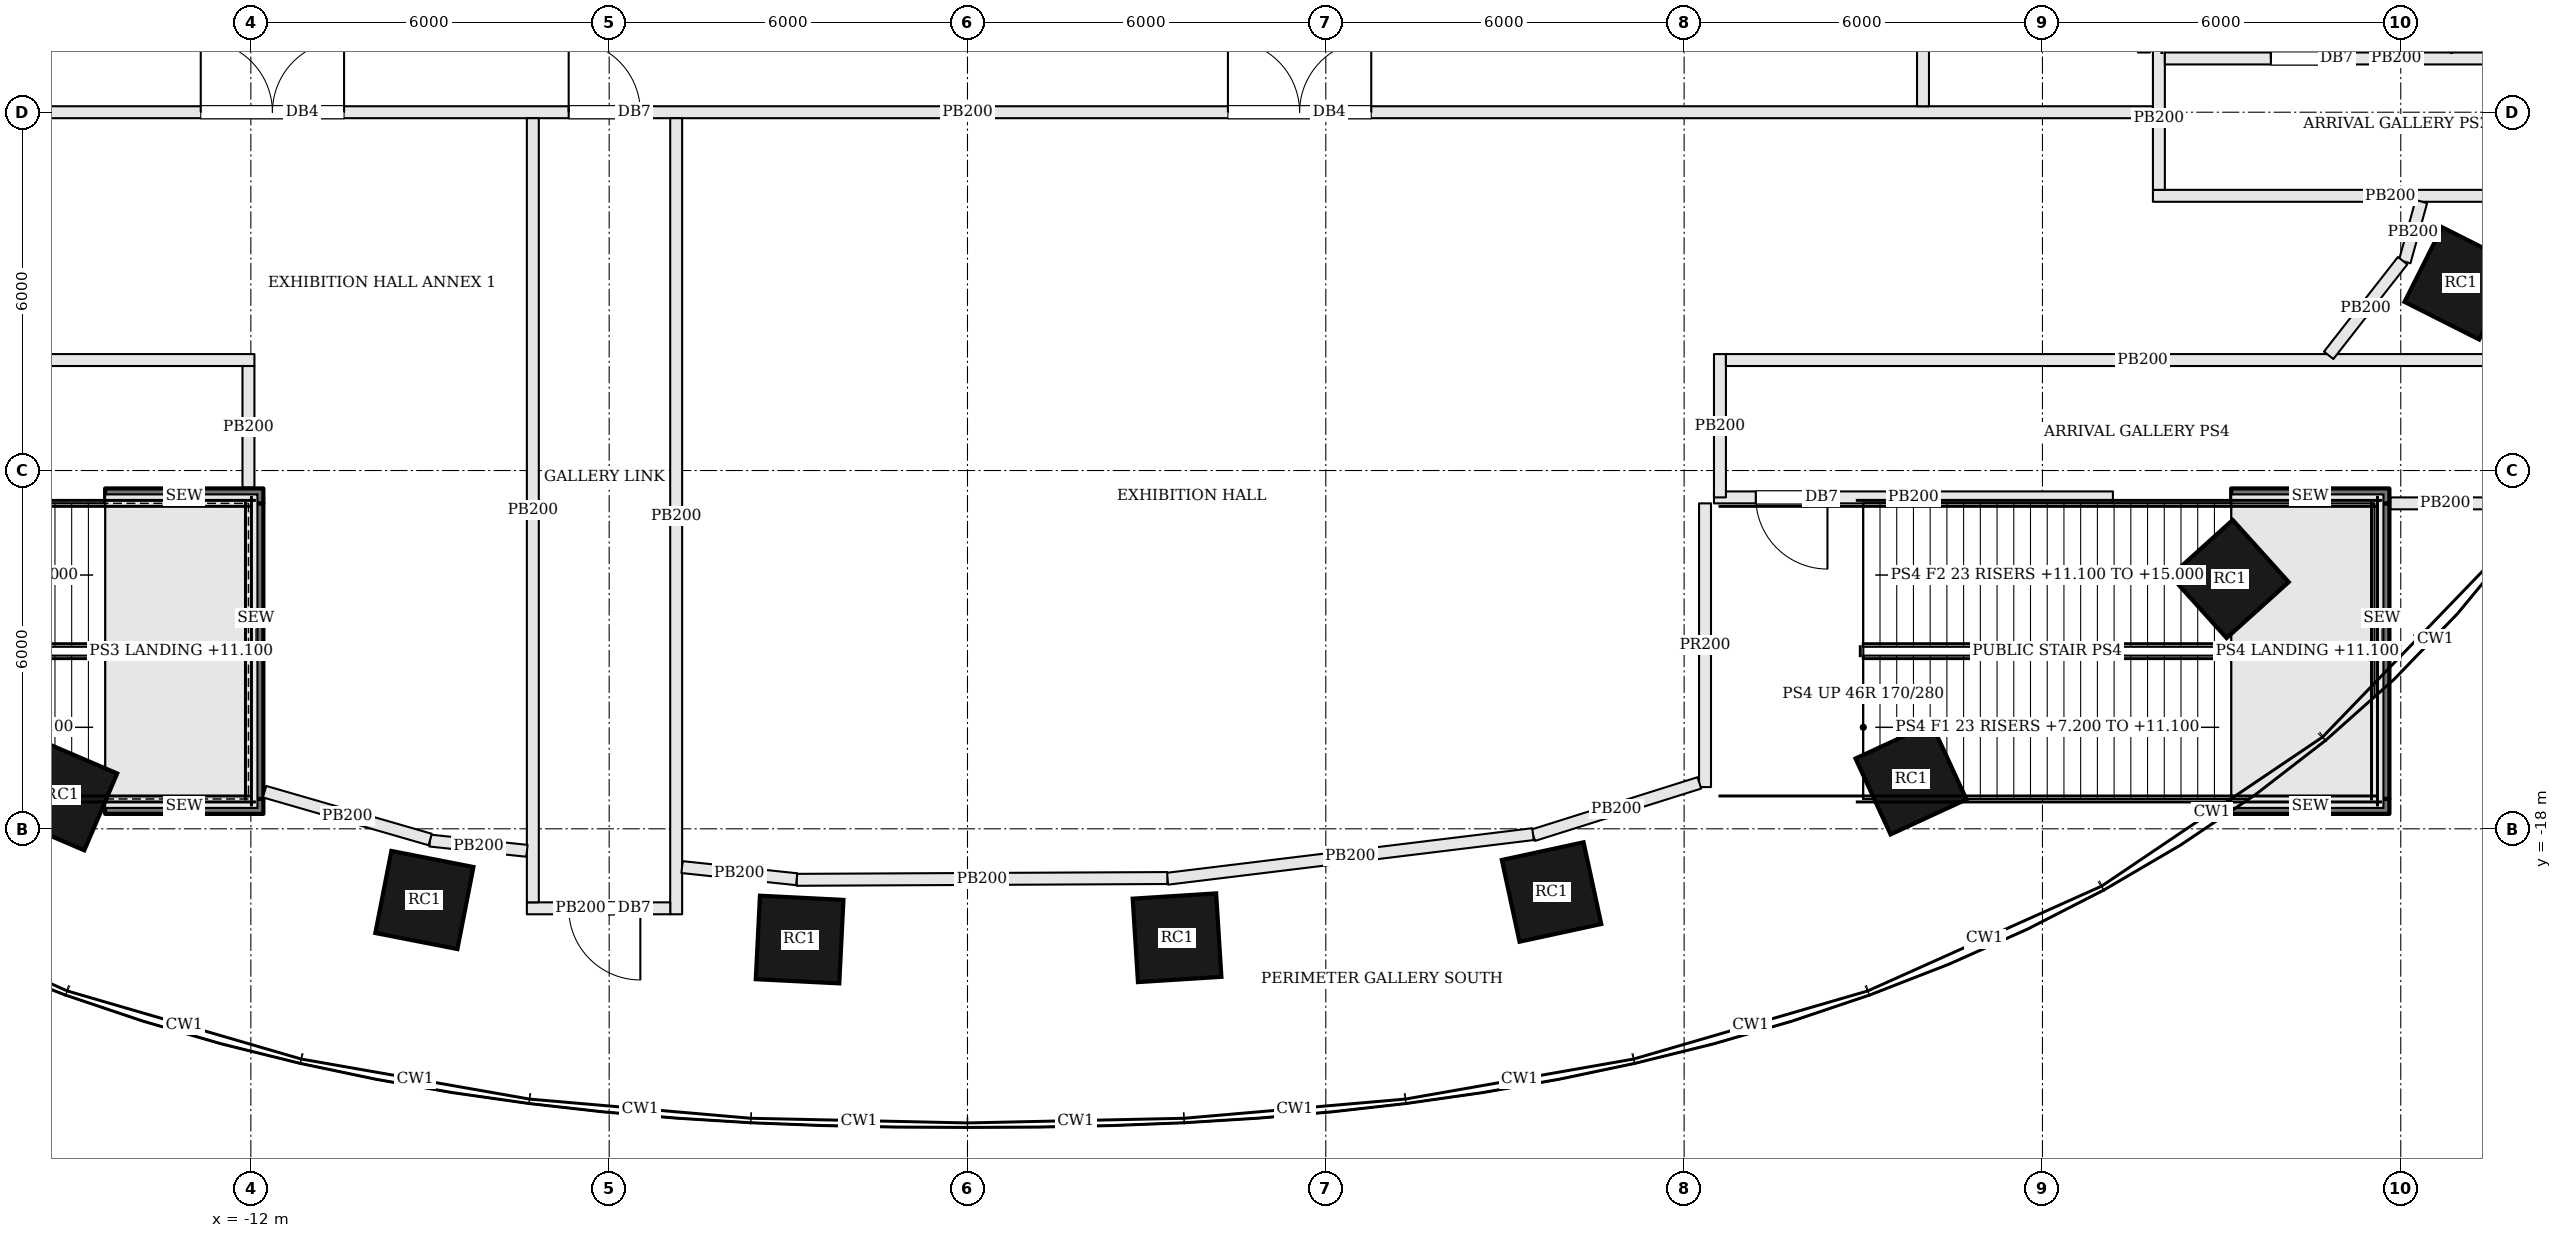
"""IFC4 building model, lengths in metres.
Left out: names, types, materials, properties, quantities, classifications, styles, units other than length and angle.
Written with IfcOpenShell. Run it as: python <this file> out.ifc"""

import sys

from ifc_helpers import new_model, si_unit, direction, frame, frame_2d, origin, origin_2d, place, context, subcontext, project, spatial, rectangle, extrude, element, fill, save


model = new_model("IFC4")
c1 = context("Model", 3, precision=1e-05, world=origin(), true_north=direction((0.0, 1.0)))
c2 = subcontext(c1, "Body", "Model", "MODEL_VIEW")
j1 = project(units=[si_unit("LENGTHUNIT", "METRE"), si_unit("PLANEANGLEUNIT", "RADIAN")], contexts=[c1])
p1 = place(None, origin())
s1 = spatial("IfcSite", under=j1, at=p1, CompositionType="ELEMENT")
p2 = place(p1, origin())
s2 = spatial("IfcBuilding", under=s1, at=p2, CompositionType="ELEMENT")
p3 = place(p2, frame((0.0, 0.0, 7.2)))
s3 = spatial("IfcBuildingStorey", under=s2, at=p3, CompositionType="ELEMENT", Elevation=7.2)
for number, where, z_axis, x_axis in (
    (1, (-15.157, -17.441, 0.0), (0.0, 0.0, 1.0), (0.919, -0.394, 0.0)),
    (2, (-9.094, -19.192, 0.0), (0.0, 0.0, 1.0), (0.981, -0.192, 0.0)),
    (3, (-2.811, -19.854, 0.0), (0.0, 0.0, 1.0), (0.999, -0.05, 0.0)),
    (4, (3.509, -19.824, 0.0), (0.0, 0.0, 1.0), (0.998, 0.063, 0.0)),
    (5, (9.78, -19.058, 0.0), (0.0, 0.0, 1.0), (0.977, 0.211, 0.0)),
    (6, (15.799, -17.165, 0.0), (0.0, 0.0, 1.0), (0.908, 0.419, 0.0)),
    (7, (21.135, -13.817, 0.0), (0.0, 0.0, 1.0), (0.743, 0.67, 0.0)),
    (8, (25.003, -8.866, 0.0), (0.0, 0.0, 1.0), (0.45, 0.893, 0.0)),
):
    element("IfcColumn", number, at=place(p3, frame(where, z_axis=z_axis, x_axis=x_axis)), inside=s3, PredefinedType="COLUMN", context=c2, shape_type="SweptSolid", body=[
        extrude(rectangle(XDim=1.4, YDim=1.4, at=origin_2d()), origin(), (0.0, 0.0, 1.0), 7.8),
    ])
p4 = place(p3, frame((27.8, -7.4, 0.0), z_axis=(0.0, 0.0, 1.0), x_axis=(-1.0, 0.0, 0.0)))
e9 = element("IfcWall", 9, at=p4, inside=s3, PredefinedType="PARTITIONING", context=c2, shape_type="SweptSolid", body=[
    extrude(rectangle(XDim=7.95, YDim=0.2, at=frame_2d((3.975, 0.0))), origin(), (0.0, 0.0, 1.0), 6.83),
])
p5 = place(p3, frame((19.95, -7.3, 0.0), z_axis=(0.0, 0.0, 1.0), x_axis=(0.0, 1.0, 0.0)))
e10 = element("IfcWall", 10, at=p5, inside=s3, PredefinedType="PARTITIONING", context=c2, shape_type="SweptSolid", body=[
    extrude(rectangle(XDim=2.4, YDim=0.2, at=frame_2d((1.2, 0.0))), origin(), (0.0, 0.0, 1.0), 6.83),
])
p6 = place(p3, frame((20.05, -5.1, 0.0), z_axis=(0.0, 0.0, 1.0), x_axis=(1.0, 0.0, 0.0)))
e11 = element("IfcWall", 11, at=p6, inside=s3, PredefinedType="PARTITIONING", context=c2, shape_type="SweptSolid", body=[
    extrude(rectangle(XDim=7.75, YDim=0.2, at=frame_2d((3.875, 0.0))), origin(), (0.0, 0.0, 1.0), 6.83),
])
p7 = place(p6, frame((1.775, 0.0, 0.0)))
e12 = element("IfcOpeningElement", 12, at=p7, cuts=e11, PredefinedType="OPENING", context=c2, shape_type="SweptSolid", body=[
    extrude(rectangle(XDim=1.2, YDim=2.1, at=frame_2d((0.6, 1.05))), frame((0.0, 0.11, 0.0), z_axis=(0.0, -1.0, 0.0), x_axis=(1.0, 0.0, 0.0)), (0.0, 0.0, 1.0), 0.22),
])
p8 = place(p3, frame((-23.826, -10.15, 0.0), z_axis=(0.0, 0.0, 1.0), x_axis=(1.0, 0.0, 0.0)))
e13 = element("IfcWall", 13, at=p8, inside=s3, PredefinedType="PARTITIONING", context=c2, shape_type="SweptSolid", body=[
    extrude(rectangle(XDim=11.886, YDim=0.2, at=frame_2d((5.943, 0.0))), origin(), (0.0, 0.0, 1.0), 6.83),
])
p9 = place(p3, frame((-12.04, -10.25, 0.0), z_axis=(0.0, 0.0, 1.0), x_axis=(0.0, -1.0, 0.0)))
e14 = element("IfcWall", 14, at=p9, inside=s3, PredefinedType="PARTITIONING", context=c2, shape_type="SweptSolid", body=[
    extrude(rectangle(XDim=2.03, YDim=0.2, at=frame_2d((1.015, 0.0))), origin(), (0.0, 0.0, 1.0), 6.83),
])
p10 = place(p3, frame((25.66, -12.55, 0.0), z_axis=(0.0, 0.0, 1.0), x_axis=(-1.0, 0.0, 0.0)))
e15 = element("IfcWall", 15, at=p10, inside=s3, PredefinedType="PARTITIONING", context=c2, shape_type="SweptSolid", body=[
    extrude(rectangle(XDim=1.83, YDim=0.2, at=frame_2d((0.915, 0.0))), origin(), (0.0, 0.0, 1.0), 6.83),
])
p11 = place(p3, frame((19.18, -12.45, 0.0), z_axis=(0.0, 0.0, 1.0), x_axis=(-1.0, 0.0, 0.0)))
e16 = element("IfcWall", 16, at=p11, inside=s3, PredefinedType="PARTITIONING", context=c2, shape_type="SweptSolid", body=[
    extrude(rectangle(XDim=6.68, YDim=0.2, at=frame_2d((3.34, 0.0))), origin(), (0.0, 0.0, 1.0), 6.83),
])
p12 = place(p11, frame((4.78, 0.0, 0.0)))
e17 = element("IfcOpeningElement", 17, at=p12, cuts=e16, PredefinedType="OPENING", context=c2, shape_type="SweptSolid", body=[
    extrude(rectangle(XDim=1.2, YDim=2.1, at=frame_2d((0.6, 1.05))), frame((0.0, 0.11, 0.0), z_axis=(0.0, -1.0, 0.0), x_axis=(1.0, 0.0, 0.0)), (0.0, 0.0, 1.0), 0.22),
])
p13 = place(p3, frame((12.6, -12.45, 0.0), z_axis=(0.0, 0.0, 1.0), x_axis=(0.0, 1.0, 0.0)))
e18 = element("IfcWall", 18, at=p13, inside=s3, PredefinedType="PARTITIONING", context=c2, shape_type="SweptSolid", body=[
    extrude(rectangle(XDim=2.4, YDim=0.2, at=frame_2d((1.2, 0.0))), origin(), (0.0, 0.0, 1.0), 6.83),
])
p14 = place(p3, frame((12.7, -10.15, 0.0), z_axis=(0.0, 0.0, 1.0), x_axis=(1.0, 0.0, 0.0)))
e19 = element("IfcWall", 19, at=p14, inside=s3, PredefinedType="PARTITIONING", context=c2, shape_type="SweptSolid", body=[
    extrude(rectangle(XDim=13.96, YDim=0.2, at=frame_2d((6.98, 0.0))), origin(), (0.0, 0.0, 1.0), 6.83),
])
p15 = place(p3, frame((-19.85, -6.0, 0.0), z_axis=(0.0, 0.0, 1.0), x_axis=(1.0, 0.0, 0.0)))
e20 = element("IfcWall", 20, at=p15, inside=s3, PredefinedType="PARTITIONING", context=c2, shape_type="SweptSolid", body=[
    extrude(rectangle(XDim=39.7, YDim=0.2, at=frame_2d((19.85, 0.0))), origin(), (0.0, 0.0, 1.0), 6.83),
])
p16 = place(p15, frame((13.172, 0.0, 0.0)))
e21 = element("IfcOpeningElement", 21, at=p16, cuts=e20, PredefinedType="OPENING", context=c2, shape_type="SweptSolid", body=[
    extrude(rectangle(XDim=1.2, YDim=2.1, at=frame_2d((0.6, 1.05))), frame((0.0, 0.11, 0.0), z_axis=(0.0, -1.0, 0.0), x_axis=(1.0, 0.0, 0.0)), (0.0, 0.0, 1.0), 0.22),
])
p17 = place(p15, frame((24.211, 0.0, 0.0)))
e22 = element("IfcOpeningElement", 22, at=p17, cuts=e20, PredefinedType="OPENING", context=c2, shape_type="SweptSolid", body=[
    extrude(rectangle(XDim=2.4, YDim=2.4, at=frame_2d((1.2, 1.2))), frame((0.0, 0.11, 0.0), z_axis=(0.0, -1.0, 0.0), x_axis=(1.0, 0.0, 0.0)), (0.0, 0.0, 1.0), 0.22),
])
p18 = place(p15, frame((7.011, 0.0, 0.0)))
e23 = element("IfcOpeningElement", 23, at=p18, cuts=e20, PredefinedType="OPENING", context=c2, shape_type="SweptSolid", body=[
    extrude(rectangle(XDim=2.4, YDim=2.4, at=frame_2d((1.2, 1.2))), frame((0.0, 0.11, 0.0), z_axis=(0.0, -1.0, 0.0), x_axis=(1.0, 0.0, 0.0)), (0.0, 0.0, 1.0), 0.22),
])
p19 = place(p3, frame((-4.878, -6.1, 0.0), z_axis=(0.0, 0.0, 1.0), x_axis=(0.0, -1.0, 0.0)))
e24 = element("IfcWall", 24, at=p19, inside=s3, PredefinedType="PARTITIONING", context=c2, shape_type="SweptSolid", body=[
    extrude(rectangle(XDim=13.331, YDim=0.2, at=frame_2d((6.666, 0.0))), origin(), (0.0, 0.0, 1.0), 6.83),
])
p20 = place(p3, frame((-4.978, -19.331, 0.0), z_axis=(0.0, 0.0, 1.0), x_axis=(-1.0, 0.0, 0.0)))
e25 = element("IfcWall", 25, at=p20, inside=s3, PredefinedType="PARTITIONING", context=c2, shape_type="SweptSolid", body=[
    extrude(rectangle(XDim=2.4, YDim=0.2, at=frame_2d((1.2, 0.0))), origin(), (0.0, 0.0, 1.0), 6.83),
])
p21 = place(p20, frame((0.5, 0.0, 0.0)))
e26 = element("IfcOpeningElement", 26, at=p21, cuts=e25, PredefinedType="OPENING", context=c2, shape_type="SweptSolid", body=[
    extrude(rectangle(XDim=1.2, YDim=2.1, at=frame_2d((0.6, 1.05))), frame((0.0, 0.11, 0.0), z_axis=(0.0, -1.0, 0.0), x_axis=(1.0, 0.0, 0.0)), (0.0, 0.0, 1.0), 0.22),
])
p22 = place(p3, frame((-7.278, -19.231, 0.0), z_axis=(0.0, 0.0, 1.0), x_axis=(0.0, 1.0, 0.0)))
e27 = element("IfcWall", 27, at=p22, inside=s3, PredefinedType="PARTITIONING", context=c2, shape_type="SweptSolid", body=[
    extrude(rectangle(XDim=13.131, YDim=0.2, at=frame_2d((6.565, 0.0))), origin(), (0.0, 0.0, 1.0), 6.83),
])
p23 = place(p3, frame((16.0, -5.9, 0.0), z_axis=(0.0, 0.0, 1.0), x_axis=(0.0, 1.0, 0.0)))
e28 = element("IfcWall", 28, at=p23, inside=s3, PredefinedType="PARTITIONING", context=c2, shape_type="SweptSolid", body=[
    extrude(rectangle(XDim=21.792, YDim=0.2, at=frame_2d((10.896, 0.0))), origin(), (0.0, 0.0, 1.0), 6.83),
])
p24 = place(p23, frame((9.9, 0.0, 0.0)))
e29 = element("IfcOpeningElement", 29, at=p24, cuts=e28, PredefinedType="OPENING", context=c2, shape_type="SweptSolid", body=[
    extrude(rectangle(XDim=1.0, YDim=2.1, at=frame_2d((0.5, 1.05))), frame((0.0, 0.11, 0.0), z_axis=(0.0, -1.0, 0.0), x_axis=(1.0, 0.0, 0.0)), (0.0, 0.0, 1.0), 0.22),
])
p25 = place(p3, frame((24.345, -7.496, 0.0), z_axis=(0.0, 0.0, 1.0), x_axis=(-0.267089429493, -0.963671747357, 0.0)))
e30 = element("IfcWall", 30, at=p25, inside=s3, PredefinedType="PARTITIONING", context=c2, shape_type="SweptSolid", body=[
    extrude(rectangle(XDim=1.045, YDim=0.2, at=frame_2d((0.522, 0.0))), origin(), (0.0, 0.0, 1.0), 6.83),
])
p26 = place(p3, frame((24.031, -8.486, 0.0), z_axis=(0.0, 0.0, 1.0), x_axis=(-0.615578080386, -0.788075901768, 0.0)))
e31 = element("IfcWall", 31, at=p26, inside=s3, PredefinedType="PARTITIONING", context=c2, shape_type="SweptSolid", body=[
    extrude(rectangle(XDim=2.011, YDim=0.2, at=frame_2d((1.006, 0.0))), origin(), (0.0, 0.0, 1.0), 6.83),
])
p27 = place(p3, frame((12.35, -12.55, 0.0), z_axis=(0.0, 0.0, 1.0), x_axis=(0.0, -1.0, 0.0)))
e32 = element("IfcWall", 32, at=p27, inside=s3, PredefinedType="PARTITIONING", context=c2, shape_type="SweptSolid", body=[
    extrude(rectangle(XDim=4.751, YDim=0.2, at=frame_2d((2.375, 0.0))), origin(), (0.0, 0.0, 1.0), 6.934),
])
p28 = place(p3, frame((12.255, -17.231, 0.0), z_axis=(0.0, 0.0, 1.0), x_axis=(-0.953832821469, -0.300338057344, 0.0)))
e33 = element("IfcWall", 33, at=p28, inside=s3, PredefinedType="PARTITIONING", context=c2, shape_type="SweptSolid", body=[
    extrude(rectangle(XDim=2.917, YDim=0.2, at=frame_2d((1.458, 0.0))), origin(), (0.0, 0.0, 1.0), 6.83),
])
p29 = place(p3, frame((9.469, -18.089, 0.0), z_axis=(0.0, 0.0, 1.0), x_axis=(-0.992641352158, -0.121091477758, 0.0)))
e34 = element("IfcWall", 34, at=p29, inside=s3, PredefinedType="PARTITIONING", context=c2, shape_type="SweptSolid", body=[
    extrude(rectangle(XDim=6.167, YDim=0.2, at=frame_2d((3.084, 0.0))), origin(), (0.0, 0.0, 1.0), 6.83),
])
p30 = place(p3, frame((3.346, -18.824, 0.0), z_axis=(0.0, 0.0, 1.0), x_axis=(-0.999988297333, -0.004837891778, 0.0)))
e35 = element("IfcWall", 35, at=p30, inside=s3, PredefinedType="PARTITIONING", context=c2, shape_type="SweptSolid", body=[
    extrude(rectangle(XDim=6.207, YDim=0.2, at=frame_2d((3.104, 0.0))), origin(), (0.0, 0.0, 1.0), 6.83),
])
p31 = place(p3, frame((-2.86, -18.844, 0.0), z_axis=(0.0, 0.0, 1.0), x_axis=(-0.994457513639, 0.105139210412, 0.0)))
e36 = element("IfcWall", 36, at=p31, inside=s3, PredefinedType="PARTITIONING", context=c2, shape_type="SweptSolid", body=[
    extrude(rectangle(XDim=1.93, YDim=0.2, at=frame_2d((0.965, 0.0))), origin(), (0.0, 0.0, 1.0), 6.83),
])
p32 = place(p3, frame((-7.377, -18.368, 0.0), z_axis=(0.0, 0.0, 1.0), x_axis=(-0.994502173657, 0.104715932846, 0.0)))
e37 = element("IfcWall", 37, at=p32, inside=s3, PredefinedType="PARTITIONING", context=c2, shape_type="SweptSolid", body=[
    extrude(rectangle(XDim=1.632, YDim=0.2, at=frame_2d((0.816, 0.0))), origin(), (0.0, 0.0, 1.0), 6.83),
])
p33 = place(p3, frame((-8.997, -18.179, 0.0), z_axis=(0.0, 0.0, 1.0), x_axis=(-0.960718693411, 0.277524038834, 0.0)))
e38 = element("IfcWall", 38, at=p33, inside=s3, PredefinedType="PARTITIONING", context=c2, shape_type="SweptSolid", body=[
    extrude(rectangle(XDim=2.886, YDim=0.2, at=frame_2d((1.443, 0.0))), origin(), (0.0, 0.0, 1.0), 6.83),
])
p34 = place(p3, frame((-11.915, -17.5, 0.0), z_axis=(0.0, 0.0, 1.0), x_axis=(0.0, 1.0, 0.0)))
e39 = element("IfcWall", 39, at=p34, inside=s3, PredefinedType="SOLIDWALL", context=c2, shape_type="SweptSolid", body=[
    extrude(rectangle(XDim=4.95, YDim=0.25, at=frame_2d((2.475, 0.0))), origin(), (0.0, 0.0, 1.0), 7.55),
])
for number, where, z_axis, x_axis in (
    (40, (-14.44, -17.625, 0.0), (0.0, 0.0, 1.0), (1.0, 0.0, 0.0)),
    (41, (-14.44, -12.425, 0.0), (0.0, 0.0, 1.0), (1.0, 0.0, 0.0)),
):
    element("IfcWall", number, at=place(p3, frame(where, z_axis=z_axis, x_axis=x_axis)), inside=s3, PredefinedType="SOLIDWALL", context=c2, shape_type="SweptSolid", body=[
        extrude(rectangle(XDim=2.65, YDim=0.25, at=frame_2d((1.325, 0.0))), origin(), (0.0, 0.0, 1.0), 7.55),
    ])
p35 = place(p3, frame((23.685, -17.5, 0.0), z_axis=(0.0, 0.0, 1.0), x_axis=(0.0, 1.0, 0.0)))
e42 = element("IfcWall", 42, at=p35, inside=s3, PredefinedType="SOLIDWALL", context=c2, shape_type="SweptSolid", body=[
    extrude(rectangle(XDim=4.95, YDim=0.25, at=frame_2d((2.475, 0.0))), origin(), (0.0, 0.0, 1.0), 7.55),
])
for number, where, z_axis, x_axis in (
    (43, (21.16, -17.625, 0.0), (0.0, 0.0, 1.0), (1.0, 0.0, 0.0)),
    (44, (21.16, -12.425, 0.0), (0.0, 0.0, 1.0), (1.0, 0.0, 0.0)),
):
    element("IfcWall", number, at=place(p3, frame(where, z_axis=z_axis, x_axis=x_axis)), inside=s3, PredefinedType="SOLIDWALL", context=c2, shape_type="SweptSolid", body=[
        extrude(rectangle(XDim=2.65, YDim=0.25, at=frame_2d((1.325, 0.0))), origin(), (0.0, 0.0, 1.0), 7.55),
    ])
p36 = place(p16, origin())
e45 = element("IfcDoor", 45, at=p36, inside=s3, OperationType="SINGLE_SWING_LEFT", PredefinedType="DOOR", context=c2, shape_type="SweptSolid", body=[
    extrude(rectangle(XDim=1.2, YDim=2.1, at=frame_2d((0.6, 1.05))), frame((0.0, 0.025, 0.0), z_axis=(0.0, -1.0, 0.0), x_axis=(1.0, 0.0, 0.0)), (0.0, 0.0, 1.0), 0.05),
])
fill(e21, e45)
p37 = place(p21, origin())
e46 = element("IfcDoor", 46, at=p37, inside=s3, OperationType="SINGLE_SWING_LEFT", PredefinedType="DOOR", context=c2, shape_type="SweptSolid", body=[
    extrude(rectangle(XDim=1.2, YDim=2.1, at=frame_2d((0.6, 1.05))), frame((0.0, 0.025, 0.0), z_axis=(0.0, -1.0, 0.0), x_axis=(1.0, 0.0, 0.0)), (0.0, 0.0, 1.0), 0.05),
])
fill(e26, e46)
p38 = place(p7, origin())
e47 = element("IfcDoor", 47, at=p38, inside=s3, OperationType="SINGLE_SWING_LEFT", PredefinedType="DOOR", context=c2, shape_type="SweptSolid", body=[
    extrude(rectangle(XDim=1.2, YDim=2.1, at=frame_2d((0.6, 1.05))), frame((0.0, 0.025, 0.0), z_axis=(0.0, -1.0, 0.0), x_axis=(1.0, 0.0, 0.0)), (0.0, 0.0, 1.0), 0.05),
])
fill(e12, e47)
p39 = place(p12, origin())
e48 = element("IfcDoor", 48, at=p39, inside=s3, OperationType="SINGLE_SWING_LEFT", PredefinedType="DOOR", context=c2, shape_type="SweptSolid", body=[
    extrude(rectangle(XDim=1.2, YDim=2.1, at=frame_2d((0.6, 1.05))), frame((0.0, 0.025, 0.0), z_axis=(0.0, -1.0, 0.0), x_axis=(1.0, 0.0, 0.0)), (0.0, 0.0, 1.0), 0.05),
])
fill(e17, e48)
p40 = place(p17, origin())
e49 = element("IfcDoor", 49, at=p40, inside=s3, OperationType="DOUBLE_DOOR_SINGLE_SWING", PredefinedType="DOOR", context=c2, shape_type="SweptSolid", body=[
    extrude(rectangle(XDim=2.4, YDim=2.4, at=frame_2d((1.2, 1.2))), frame((0.0, 0.025, 0.0), z_axis=(0.0, -1.0, 0.0), x_axis=(1.0, 0.0, 0.0)), (0.0, 0.0, 1.0), 0.05),
])
fill(e22, e49)
p41 = place(p18, origin())
e50 = element("IfcDoor", 50, at=p41, inside=s3, OperationType="DOUBLE_DOOR_SINGLE_SWING", PredefinedType="DOOR", context=c2, shape_type="SweptSolid", body=[
    extrude(rectangle(XDim=2.4, YDim=2.4, at=frame_2d((1.2, 1.2))), frame((0.0, 0.025, 0.0), z_axis=(0.0, -1.0, 0.0), x_axis=(1.0, 0.0, 0.0)), (0.0, 0.0, 1.0), 0.05),
])
fill(e23, e50)
save(model, sys.argv[1])
